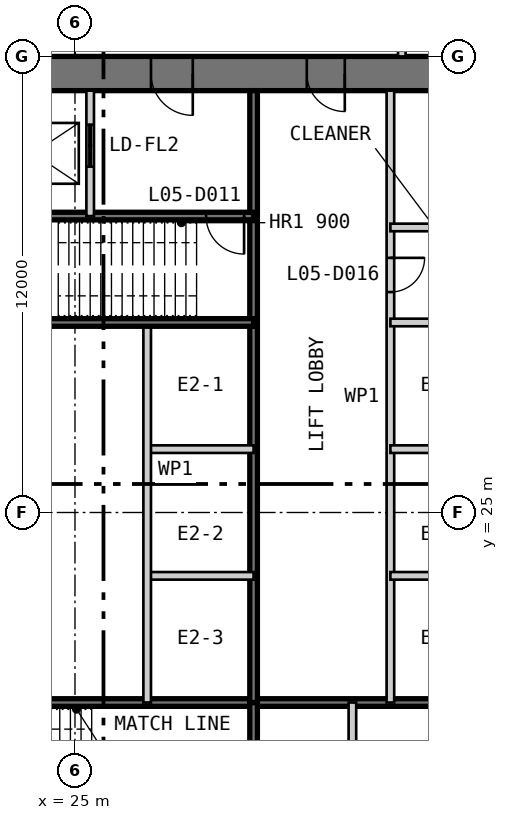
"""IFC4 building model, lengths in metres.
Left out: names, types, materials, properties, quantities, classifications, styles, units other than length and angle.
Written with IfcOpenShell. Run it as: python <this file> out.ifc"""

import sys

from ifc_helpers import new_model, si_unit, direction, frame, frame_2d, origin, place, context, subcontext, project, spatial, polyline, rectangle, outline, extrude, element, fill, save


model = new_model("IFC4")
c1 = context("Model", 3, precision=1e-05, world=origin(), true_north=direction((0.0, 1.0)))
c2 = subcontext(c1, "Body", "Model", "MODEL_VIEW")
j1 = project(units=[si_unit("LENGTHUNIT", "METRE"), si_unit("PLANEANGLEUNIT", "RADIAN")], contexts=[c1])
p1 = place(None, origin())
s1 = spatial("IfcSite", under=j1, at=p1, CompositionType="ELEMENT")
p2 = place(p1, origin())
s2 = spatial("IfcBuilding", under=s1, at=p2, CompositionType="ELEMENT")
p3 = place(p2, frame((0.0, 0.0, 26.2)))
s3 = spatial("IfcBuildingStorey", under=s2, at=p3, CompositionType="ELEMENT", Elevation=26.2)
p4 = place(p3, frame((37.0, 36.55, 0.0), z_axis=(0.0, 0.0, 1.0), x_axis=(-1.0, 0.0, 0.0)))
e1 = element("IfcWall", 1, at=p4, inside=s3, PredefinedType="SHEAR", context=c2, shape_type="SweptSolid", body=[
    extrude(outline(polyline([(0.0, -0.45), (24.0, -0.45), (23.1, 0.45), (0.9, 0.45), (0.0, -0.45)])), origin(), (0.0, 0.0, 1.0), 4.8),
])
p5 = place(p4, frame((4.9, 0.0, 0.0)))
e2 = element("IfcOpeningElement", 2, at=p5, cuts=e1, PredefinedType="OPENING", context=c2, shape_type="SweptSolid", body=[
    extrude(rectangle(XDim=1.0, YDim=2.2, at=frame_2d((0.5, 1.1))), frame((0.0, 0.46, 0.0), z_axis=(0.0, -1.0, 0.0), x_axis=(1.0, 0.0, 0.0)), (0.0, 0.0, 1.0), 0.92),
])
p6 = place(p4, frame((8.9, 0.0, 0.0)))
e3 = element("IfcOpeningElement", 3, at=p6, cuts=e1, PredefinedType="OPENING", context=c2, shape_type="SweptSolid", body=[
    extrude(rectangle(XDim=1.1, YDim=2.2, at=frame_2d((0.55, 1.1))), frame((0.0, 0.46, 0.0), z_axis=(0.0, -1.0, 0.0), x_axis=(1.0, 0.0, 0.0)), (0.0, 0.0, 1.0), 0.92),
])
p7 = place(p4, frame((15.05, 0.0, 0.0)))
e4 = element("IfcOpeningElement", 4, at=p7, cuts=e1, PredefinedType="OPENING", context=c2, shape_type="SweptSolid", body=[
    extrude(rectangle(XDim=0.9, YDim=2.2, at=frame_2d((0.45, 1.1))), frame((0.0, 0.46, 0.0), z_axis=(0.0, -1.0, 0.0), x_axis=(1.0, 0.0, 0.0)), (0.0, 0.0, 1.0), 0.92),
])
p8 = place(p4, frame((17.9, 0.0, 0.0)))
e5 = element("IfcOpeningElement", 5, at=p8, cuts=e1, PredefinedType="OPENING", context=c2, shape_type="SweptSolid", body=[
    extrude(rectangle(XDim=1.0, YDim=2.2, at=frame_2d((0.5, 1.1))), frame((0.0, 0.46, 0.0), z_axis=(0.0, -1.0, 0.0), x_axis=(1.0, 0.0, 0.0)), (0.0, 0.0, 1.0), 0.92),
])
p9 = place(p4, frame((21.4, 0.0, 0.0)))
e6 = element("IfcOpeningElement", 6, at=p9, cuts=e1, PredefinedType="OPENING", context=c2, shape_type="SweptSolid", body=[
    extrude(rectangle(XDim=1.0, YDim=2.2, at=frame_2d((0.5, 1.1))), frame((0.0, 0.46, 0.0), z_axis=(0.0, -1.0, 0.0), x_axis=(1.0, 0.0, 0.0)), (0.0, 0.0, 1.0), 0.92),
])
p10 = place(p3, frame((20.3, 20.0, 0.0), z_axis=(0.0, 0.0, 1.0), x_axis=(1.0, 0.0, 0.0)))
e7 = element("IfcWall", 7, at=p10, inside=s3, PredefinedType="SOLIDWALL", context=c2, shape_type="SweptSolid", body=[
    extrude(rectangle(XDim=15.8, YDim=0.2, at=frame_2d((7.9, 0.0))), origin(), (0.0, 0.0, 1.0), 4.6),
])
p11 = place(p3, frame((29.7, 13.9, 0.0), z_axis=(0.0, 0.0, 1.0), x_axis=(0.0, 1.0, 0.0)))
e8 = element("IfcWall", 8, at=p11, inside=s3, PredefinedType="SOLIDWALL", context=c2, shape_type="SweptSolid", body=[
    extrude(rectangle(XDim=6.1, YDim=0.2, at=frame_2d((3.05, 0.0))), origin(), (0.0, 0.0, 1.0), 4.6),
])
p12 = place(p3, frame((32.3, 13.9, 0.0), z_axis=(0.0, 0.0, 1.0), x_axis=(0.0, 1.0, 0.0)))
e9 = element("IfcWall", 9, at=p12, inside=s3, PredefinedType="PARTITIONING", context=c2, shape_type="SweptSolid", body=[
    extrude(rectangle(XDim=6.1, YDim=0.2, at=frame_2d((3.05, 0.0))), origin(), (0.0, 0.0, 1.0), 4.6),
])
p13 = place(p3, frame((33.3, 36.1, 0.0), z_axis=(0.0, 0.0, 1.0), x_axis=(0.0, -1.0, 0.0)))
e10 = element("IfcWall", 10, at=p13, inside=s3, PredefinedType="PARTITIONING", context=c2, shape_type="SweptSolid", body=[
    extrude(rectangle(XDim=16.1, YDim=0.2, at=frame_2d((8.05, 0.0))), origin(), (0.0, 0.0, 1.0), 4.6),
])
p14 = place(p13, frame((4.4, 0.0, 0.0)))
e11 = element("IfcOpeningElement", 11, at=p14, cuts=e10, PredefinedType="OPENING", context=c2, shape_type="SweptSolid", body=[
    extrude(rectangle(XDim=0.9, YDim=2.2, at=frame_2d((0.45, 1.1))), frame((0.0, 0.11, 0.0), z_axis=(0.0, -1.0, 0.0), x_axis=(1.0, 0.0, 0.0)), (0.0, 0.0, 1.0), 0.22),
])
p15 = place(p3, frame((29.7, 36.1, 0.0), z_axis=(0.0, 0.0, 1.0), x_axis=(0.0, -1.0, 0.0)))
e12 = element("IfcWall", 12, at=p15, inside=s3, PredefinedType="SOLIDWALL", context=c2, shape_type="SweptSolid", body=[
    extrude(rectangle(XDim=16.1, YDim=0.2, at=frame_2d((8.05, 0.0))), origin(), (0.0, 0.0, 1.0), 4.6),
])
for number, where, z_axis, x_axis in (
    (13, (36.1, 30.0, 0.0), (0.0, 0.0, 1.0), (-1.0, 0.0, 0.0)),
    (14, (36.1, 26.667, 0.0), (0.0, 0.0, 1.0), (-1.0, 0.0, 0.0)),
    (15, (36.1, 23.333, 0.0), (0.0, 0.0, 1.0), (-1.0, 0.0, 0.0)),
    (16, (29.7, 26.667, 0.0), (0.0, 0.0, 1.0), (-1.0, 0.0, 0.0)),
    (17, (29.7, 23.333, 0.0), (0.0, 0.0, 1.0), (-1.0, 0.0, 0.0)),
):
    element("IfcWall", number, at=place(p3, frame(where, z_axis=z_axis, x_axis=x_axis)), inside=s3, PredefinedType="PARTITIONING", context=c2, shape_type="SweptSolid", body=[
        extrude(rectangle(XDim=2.8, YDim=0.2, at=frame_2d((1.4, 0.0))), origin(), (0.0, 0.0, 1.0), 4.6),
    ])
p16 = place(p3, frame((26.9, 30.0, 0.0), z_axis=(0.0, 0.0, 1.0), x_axis=(0.0, -1.0, 0.0)))
e18 = element("IfcWall", 18, at=p16, inside=s3, PredefinedType="PARTITIONING", context=c2, shape_type="SweptSolid", body=[
    extrude(rectangle(XDim=10.0, YDim=0.2, at=frame_2d((5.0, 0.0))), origin(), (0.0, 0.0, 1.0), 4.6),
])
p17 = place(p3, frame((29.7, 32.8, 0.0), z_axis=(0.0, 0.0, 1.0), x_axis=(-1.0, 0.0, 0.0)))
e19 = element("IfcWall", 19, at=p17, inside=s3, PredefinedType="SOLIDWALL", context=c2, shape_type="SweptSolid", body=[
    extrude(rectangle(XDim=9.4, YDim=0.2, at=frame_2d((4.7, 0.0))), origin(), (0.0, 0.0, 1.0), 4.6),
])
p18 = place(p17, frame((0.25, 0.0, 0.0)))
e20 = element("IfcOpeningElement", 20, at=p18, cuts=e19, PredefinedType="OPENING", context=c2, shape_type="SweptSolid", body=[
    extrude(rectangle(XDim=1.0, YDim=2.2, at=frame_2d((0.5, 1.1))), frame((0.0, 0.11, 0.0), z_axis=(0.0, -1.0, 0.0), x_axis=(1.0, 0.0, 0.0)), (0.0, 0.0, 1.0), 0.22),
])
p19 = place(p3, frame((29.7, 30.0, 0.0), z_axis=(0.0, 0.0, 1.0), x_axis=(-1.0, 0.0, 0.0)))
e21 = element("IfcWall", 21, at=p19, inside=s3, PredefinedType="SOLIDWALL", context=c2, shape_type="SweptSolid", body=[
    extrude(rectangle(XDim=15.8, YDim=0.2, at=frame_2d((7.9, 0.0))), origin(), (0.0, 0.0, 1.0), 4.6),
])
p20 = place(p3, frame((25.4, 36.1, 0.0), z_axis=(0.0, 0.0, 1.0), x_axis=(0.0, -1.0, 0.0)))
e22 = element("IfcWall", 22, at=p20, inside=s3, PredefinedType="PARTITIONING", context=c2, shape_type="SweptSolid", body=[
    extrude(rectangle(XDim=3.3, YDim=0.2, at=frame_2d((1.65, 0.0))), origin(), (0.0, 0.0, 1.0), 4.6),
])
p21 = place(p20, frame((0.9, 0.0, 0.0)))
e23 = element("IfcOpeningElement", 23, at=p21, cuts=e22, PredefinedType="OPENING", context=c2, shape_type="SweptSolid", body=[
    extrude(rectangle(XDim=1.1, YDim=2.2, at=frame_2d((0.55, 1.1))), frame((0.0, 0.11, 0.0), z_axis=(0.0, -1.0, 0.0), x_axis=(1.0, 0.0, 0.0)), (0.0, 0.0, 1.0), 0.22),
])
p22 = place(p3, frame((36.1, 32.5, 0.0), z_axis=(0.0, 0.0, 1.0), x_axis=(-1.0, 0.0, 0.0)))
e24 = element("IfcWall", 24, at=p22, inside=s3, PredefinedType="PARTITIONING", context=c2, shape_type="SweptSolid", body=[
    extrude(rectangle(XDim=2.8, YDim=0.2, at=frame_2d((1.4, 0.0))), origin(), (0.0, 0.0, 1.0), 4.6),
])
p23 = place(p3, frame((33.6, 37.0, 0.0), z_axis=(0.0, 0.0, 1.0), x_axis=(0.0, 1.0, 0.0)))
e25 = element("IfcWall", 25, at=p23, inside=s3, PredefinedType="PARTITIONING", context=c2, shape_type="SweptSolid", body=[
    extrude(rectangle(XDim=6.0, YDim=0.2, at=frame_2d((3.0, 0.0))), origin(), (0.0, 0.0, 1.0), 4.5),
])
p24 = place(p23, frame((2.55, 0.0, 0.0)))
e26 = element("IfcOpeningElement", 26, at=p24, cuts=e25, PredefinedType="OPENING", context=c2, shape_type="SweptSolid", body=[
    extrude(rectangle(XDim=0.9, YDim=2.2, at=frame_2d((0.45, 1.1))), frame((0.0, 0.11, 0.0), z_axis=(0.0, -1.0, 0.0), x_axis=(1.0, 0.0, 0.0)), (0.0, 0.0, 1.0), 0.22),
])
p25 = place(p5, origin())
e27 = element("IfcDoor", 27, at=p25, inside=s3, OperationType="SINGLE_SWING_LEFT", PredefinedType="DOOR", context=c2, shape_type="SweptSolid", body=[
    extrude(rectangle(XDim=1.0, YDim=2.2, at=frame_2d((0.5, 1.1))), frame((0.0, 0.025, 0.0), z_axis=(0.0, -1.0, 0.0), x_axis=(1.0, 0.0, 0.0)), (0.0, 0.0, 1.0), 0.05),
    extrude(outline(polyline([(0.0, 0.0), (0.04, 0.0), (0.04, 2.16), (0.96, 2.16), (0.96, 0.0), (1.0, 0.0), (1.0, 2.2), (0.0, 2.2), (0.0, 0.0)])), frame((0.0, 0.3, 0.0), z_axis=(0.0, -1.0, 0.0), x_axis=(1.0, 0.0, 0.0)), (0.0, 0.0, 1.0), 0.6),
])
fill(e2, e27)
p26 = place(p6, origin())
e28 = element("IfcDoor", 28, at=p26, inside=s3, OperationType="SINGLE_SWING_LEFT", PredefinedType="DOOR", context=c2, shape_type="SweptSolid", body=[
    extrude(rectangle(XDim=1.1, YDim=2.2, at=frame_2d((0.55, 1.1))), frame((0.0, 0.025, 0.0), z_axis=(0.0, -1.0, 0.0), x_axis=(1.0, 0.0, 0.0)), (0.0, 0.0, 1.0), 0.05),
    extrude(outline(polyline([(0.0, 0.0), (0.04, 0.0), (0.04, 2.16), (1.06, 2.16), (1.06, 0.0), (1.1, 0.0), (1.1, 2.2), (0.0, 2.2), (0.0, 0.0)])), frame((0.0, 0.3, 0.0), z_axis=(0.0, -1.0, 0.0), x_axis=(1.0, 0.0, 0.0)), (0.0, 0.0, 1.0), 0.6),
])
fill(e3, e28)
p27 = place(p18, origin())
e29 = element("IfcDoor", 29, at=p27, inside=s3, OperationType="SINGLE_SWING_LEFT", PredefinedType="DOOR", context=c2, shape_type="SweptSolid", body=[
    extrude(rectangle(XDim=1.0, YDim=2.2, at=frame_2d((0.5, 1.1))), frame((0.0, 0.025, 0.0), z_axis=(0.0, -1.0, 0.0), x_axis=(1.0, 0.0, 0.0)), (0.0, 0.0, 1.0), 0.05),
])
fill(e20, e29)
p28 = place(p14, origin())
e30 = element("IfcDoor", 30, at=p28, inside=s3, OperationType="SINGLE_SWING_LEFT", PredefinedType="DOOR", context=c2, shape_type="SweptSolid", body=[
    extrude(rectangle(XDim=0.9, YDim=2.2, at=frame_2d((0.45, 1.1))), frame((0.0, 0.025, 0.0), z_axis=(0.0, -1.0, 0.0), x_axis=(1.0, 0.0, 0.0)), (0.0, 0.0, 1.0), 0.05),
])
fill(e11, e30)
p29 = place(p21, origin())
e31 = element("IfcDoor", 31, at=p29, inside=s3, OperationType="DOUBLE_DOOR_SLIDING", PredefinedType="DOOR", context=c2, shape_type="SweptSolid", body=[
    extrude(rectangle(XDim=1.1, YDim=2.2, at=frame_2d((0.55, 1.1))), frame((0.0, 0.025, 0.0), z_axis=(0.0, -1.0, 0.0), x_axis=(1.0, 0.0, 0.0)), (0.0, 0.0, 1.0), 0.05),
])
fill(e23, e31)
save(model, sys.argv[1])
